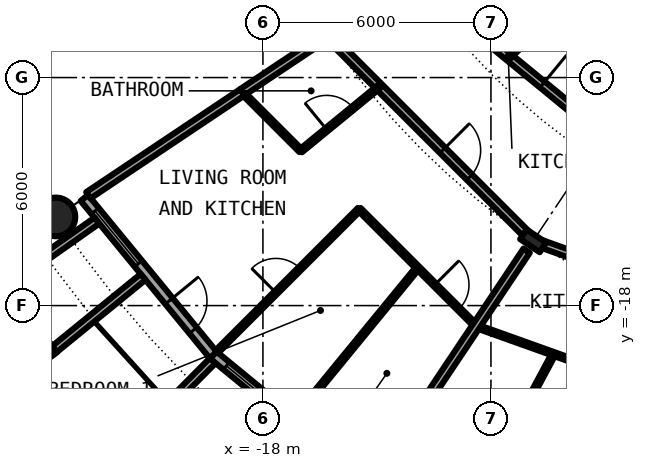
"""IFC4 building model, lengths in metres.
Left out: names, types, materials, properties, quantities, classifications, styles, units other than length and angle.
Written with IfcOpenShell. Run it as: python <this file> out.ifc"""

import sys

from ifc_helpers import new_model, si_unit, direction, frame, frame_2d, origin, origin_2d, place, context, subcontext, project, spatial, rectangle, circle, hollow_circle, i_section, extrude, element, fill, save


model = new_model("IFC4")
c1 = context("Model", 3, precision=1e-05, world=origin(), true_north=direction((0.0, 1.0)))
c2 = subcontext(c1, "Body", "Model", "MODEL_VIEW")
j1 = project(units=[si_unit("LENGTHUNIT", "METRE"), si_unit("PLANEANGLEUNIT", "RADIAN")], contexts=[c1])
p1 = place(None, origin())
s1 = spatial("IfcSite", under=j1, at=p1, CompositionType="ELEMENT")
p2 = place(p1, origin())
s2 = spatial("IfcBuilding", under=s1, at=p2, CompositionType="ELEMENT")
p3 = place(p2, frame((0.0, 0.0, 22.8)))
s3 = spatial("IfcBuildingStorey", under=s2, at=p3, CompositionType="ELEMENT", Elevation=22.8)
p4 = place(p3, frame((-23.448, -15.667, 0.0), z_axis=(0.0, 0.0, 1.0), x_axis=(1.0, 0.0, 0.0)))
e1 = element("IfcColumn", 1, at=p4, inside=s3, PredefinedType="COLUMN", context=c2, shape_type="SweptSolid", body=[
    extrude(hollow_circle(Radius=0.508, WallThickness=0.05, at=origin_2d()), origin(), (0.0, 0.0, 1.0), 3.05),
])
p5 = place(p3, frame((-10.889, -16.297, 0.0), z_axis=(0.0, 0.0, 1.0), x_axis=(-0.55557023302, -0.831469612303, 0.0)))
e2 = element("IfcColumn", 2, at=p5, inside=s3, PredefinedType="COLUMN", context=c2, shape_type="SweptSolid", body=[
    extrude(i_section(OverallWidth=0.305, OverallDepth=0.62, WebThickness=0.021, FlangeThickness=0.04, FilletRadius=0.027, at=origin_2d()), origin(), (0.0, 0.0, 1.0), 3.05),
])
p6 = place(p3, frame((-22.699, -15.167, 0.0), z_axis=(0.0, 0.0, 1.0), x_axis=(0.634382322723, -0.773019449054, 0.0)))
e3 = element("IfcWall", 3, at=p6, inside=s3, PredefinedType="SOLIDWALL", context=c2, shape_type="SweptSolid", body=[
    extrude(rectangle(XDim=5.352, YDim=0.25, at=frame_2d((2.676, 0.0))), origin(), (0.0, 0.0, 1.0), 2.7),
])
p7 = place(p6, frame((0.441, 0.0, 0.3)))
e4 = element("IfcOpeningElement", 4, at=p7, cuts=e3, PredefinedType="OPENING", context=c2, shape_type="SweptSolid", body=[
    extrude(rectangle(XDim=1.8, YDim=2.1, at=frame_2d((0.9, 1.05))), frame((0.0, 0.135, 0.0), z_axis=(0.0, -1.0, 0.0), x_axis=(1.0, 0.0, 0.0)), (0.0, 0.0, 1.0), 0.27),
])
p8 = place(p6, frame((3.51, 0.0, 0.0)))
e5 = element("IfcOpeningElement", 5, at=p8, cuts=e3, PredefinedType="OPENING", context=c2, shape_type="SweptSolid", body=[
    extrude(rectangle(XDim=1.0, YDim=2.2, at=frame_2d((0.5, 1.1))), frame((0.0, 0.135, 0.0), z_axis=(0.0, -1.0, 0.0), x_axis=(1.0, 0.0, 0.0)), (0.0, 0.0, 1.0), 0.27),
])
p9 = place(p3, frame((-24.909, -17.427, -0.03), z_axis=(0.0, 0.0, 1.0), x_axis=(0.60418752353, -0.796842165306, 0.0)))
e6 = element("IfcWall", 6, at=p9, inside=s3, PredefinedType="SOLIDWALL", context=c2, shape_type="SweptSolid", body=[
    extrude(rectangle(XDim=2.337, YDim=0.2, at=frame_2d((1.168, 0.0))), origin(), (0.0, 0.0, 1.0), 2.73),
])
p10 = place(p9, frame((0.128, 0.0, 0.33)))
e7 = element("IfcOpeningElement", 7, at=p10, cuts=e6, PredefinedType="OPENING", context=c2, shape_type="SweptSolid", body=[
    extrude(circle(Radius=1.04, at=frame_2d((1.04, 1.04))), frame((0.0, 0.11, 0.0), z_axis=(0.0, -1.0, 0.0), x_axis=(1.0, 0.0, 0.0)), (0.0, 0.0, 1.0), 0.22),
])
p11 = place(p3, frame((-22.37, -15.765, -0.03), z_axis=(0.0, 0.0, 1.0), x_axis=(-0.817256123454, -0.576274612209, 0.0)))
e8 = element("IfcWall", 8, at=p11, inside=s3, PredefinedType="SOLIDWALL", context=c2, shape_type="SweptSolid", body=[
    extrude(rectangle(XDim=2.933, YDim=0.2, at=frame_2d((1.466, 0.0))), origin(), (0.0, 0.0, 1.0), 2.73),
])
p12 = place(p3, frame((-21.155, -17.246, -0.03), z_axis=(0.0, 0.0, 1.0), x_axis=(-0.775179004516, -0.631741648902, 0.0)))
e9 = element("IfcWall", 9, at=p12, inside=s3, PredefinedType="SOLIDWALL", context=c2, shape_type="SweptSolid", body=[
    extrude(rectangle(XDim=3.006, YDim=0.2, at=frame_2d((1.503, 0.0))), origin(), (0.0, 0.0, 1.0), 2.73),
])
p13 = place(p3, frame((-19.304, -19.304, 0.0), z_axis=(0.0, 0.0, 1.0), x_axis=(0.773019449054, -0.634382322723, 0.0)))
e10 = element("IfcWall", 10, at=p13, inside=s3, PredefinedType="SOLIDWALL", context=c2, shape_type="SweptSolid", body=[
    extrude(rectangle(XDim=5.352, YDim=0.25, at=frame_2d((2.676, 0.0))), origin(), (0.0, 0.0, 1.0), 2.7),
])
p14 = place(p13, frame((0.441, 0.0, 0.3)))
e11 = element("IfcOpeningElement", 11, at=p14, cuts=e10, PredefinedType="OPENING", context=c2, shape_type="SweptSolid", body=[
    extrude(rectangle(XDim=1.8, YDim=2.1, at=frame_2d((0.9, 1.05))), frame((0.0, 0.135, 0.0), z_axis=(0.0, -1.0, 0.0), x_axis=(1.0, 0.0, 0.0)), (0.0, 0.0, 1.0), 0.27),
])
p15 = place(p13, frame((3.51, 0.0, 0.0)))
e12 = element("IfcOpeningElement", 12, at=p15, cuts=e10, PredefinedType="OPENING", context=c2, shape_type="SweptSolid", body=[
    extrude(rectangle(XDim=1.0, YDim=2.2, at=frame_2d((0.5, 1.1))), frame((0.0, 0.135, 0.0), z_axis=(0.0, -1.0, 0.0), x_axis=(1.0, 0.0, 0.0)), (0.0, 0.0, 1.0), 0.27),
])
p16 = place(p3, frame((-19.323, -19.45, -0.03), z_axis=(0.0, 0.0, 1.0), x_axis=(-0.704476739375, -0.709727076896, 0.0)))
e13 = element("IfcWall", 13, at=p16, inside=s3, PredefinedType="SOLIDWALL", context=c2, shape_type="SweptSolid", body=[
    extrude(rectangle(XDim=2.883, YDim=0.2, at=frame_2d((1.441, 0.0))), origin(), (0.0, 0.0, 1.0), 2.73),
])
p17 = place(p3, frame((-18.542, -12.389, 0.0), z_axis=(0.0, 0.0, 1.0), x_axis=(0.707106781187, -0.707106781187, 0.0)))
e14 = element("IfcWall", 14, at=p17, inside=s3, PredefinedType="PARTITIONING", context=c2, shape_type="SweptSolid", body=[
    extrude(rectangle(XDim=2.175, YDim=0.1, at=frame_2d((1.088, 0.0))), origin(), (0.0, 0.0, 1.0), 2.7),
])
p18 = place(p3, frame((-15.463, -15.468, 0.0), z_axis=(0.0, 0.0, 1.0), x_axis=(0.707106781187, -0.707106781187, 0.0)))
e15 = element("IfcWall", 15, at=p18, inside=s3, PredefinedType="PARTITIONING", context=c2, shape_type="SweptSolid", body=[
    extrude(rectangle(XDim=4.351, YDim=0.1, at=frame_2d((2.176, 0.0))), origin(), (0.0, 0.0, 1.0), 2.7),
])
p19 = place(p18, frame((2.808, 0.0, 0.0)))
e16 = element("IfcOpeningElement", 16, at=p19, cuts=e15, PredefinedType="OPENING", context=c2, shape_type="SweptSolid", body=[
    extrude(rectangle(XDim=0.9, YDim=2.3, at=frame_2d((0.45, 1.15))), frame((0.0, 0.06, 0.0), z_axis=(0.0, -1.0, 0.0), x_axis=(1.0, 0.0, 0.0)), (0.0, 0.0, 1.0), 0.12),
])
p20 = place(p3, frame((-12.389, -18.542, 0.0), z_axis=(0.0, 0.0, 1.0), x_axis=(0.941556976264, -0.336853767159, 0.0)))
e17 = element("IfcWall", 17, at=p20, inside=s3, PredefinedType="PARTITIONING", context=c2, shape_type="SweptSolid", body=[
    extrude(rectangle(XDim=4.334, YDim=0.1, at=frame_2d((2.167, 0.0))), origin(), (0.0, 0.0, 1.0), 2.7),
])
p21 = place(p3, frame((-16.187, -10.999, 0.0), z_axis=(0.0, 0.0, 1.0), x_axis=(0.707106781187, -0.707106781187, 0.0)))
e18 = element("IfcWall", 18, at=p21, inside=s3, PredefinedType="PARTITIONING", context=c2, shape_type="SweptSolid", body=[
    extrude(rectangle(XDim=7.337, YDim=0.2, at=frame_2d((3.668, 0.0))), origin(), (0.0, 0.0, 1.0), 2.38),
])
p22 = place(p21, frame((4.124, 0.0, 0.0)))
e19 = element("IfcOpeningElement", 19, at=p22, cuts=e18, PredefinedType="OPENING", context=c2, shape_type="SweptSolid", body=[
    extrude(rectangle(XDim=1.0, YDim=2.3, at=frame_2d((0.5, 1.15))), frame((0.0, 0.11, 0.0), z_axis=(0.0, -1.0, 0.0), x_axis=(1.0, 0.0, 0.0)), (0.0, 0.0, 1.0), 0.22),
])
p23 = place(p3, frame((-10.741, -16.35, 0.0), z_axis=(0.0, 0.0, 1.0), x_axis=(0.941539496009, -0.336902623105, 0.0)))
e20 = element("IfcWall", 20, at=p23, inside=s3, PredefinedType="PARTITIONING", context=c2, shape_type="SweptSolid", body=[
    extrude(rectangle(XDim=9.368, YDim=0.2, at=frame_2d((4.684, 0.0))), origin(), (0.0, 0.0, 1.0), 2.38),
])
p24 = place(p23, frame((5.057, 0.0, 0.0)))
e21 = element("IfcOpeningElement", 21, at=p24, cuts=e20, PredefinedType="OPENING", context=c2, shape_type="SweptSolid", body=[
    extrude(rectangle(XDim=1.0, YDim=2.3, at=frame_2d((0.5, 1.15))), frame((0.0, 0.11, 0.0), z_axis=(0.0, -1.0, 0.0), x_axis=(1.0, 0.0, 0.0)), (0.0, 0.0, 1.0), 0.22),
])
p25 = place(p3, frame((-14.038, -9.402, 0.0), z_axis=(0.0, 0.0, 1.0), x_axis=(0.773084654695, -0.634302858794, 0.0)))
e22 = element("IfcWall", 22, at=p25, inside=s3, PredefinedType="PARTITIONING", context=c2, shape_type="SweptSolid", body=[
    extrude(rectangle(XDim=9.793, YDim=0.2, at=frame_2d((4.896, 0.0))), origin(), (0.0, 0.0, 1.0), 2.7),
])
p26 = place(p25, frame((4.387, 0.0, 0.0)))
e23 = element("IfcOpeningElement", 23, at=p26, cuts=e22, PredefinedType="OPENING", context=c2, shape_type="SweptSolid", body=[
    extrude(rectangle(XDim=1.0, YDim=2.3, at=frame_2d((0.5, 1.15))), frame((0.0, 0.11, 0.0), z_axis=(0.0, -1.0, 0.0), x_axis=(1.0, 0.0, 0.0)), (0.0, 0.0, 1.0), 0.22),
])
p27 = place(p3, frame((-18.544, -12.387, 0.0), z_axis=(0.0, 0.0, 1.0), x_axis=(0.832066006555, 0.554676627176, 0.0)))
e24 = element("IfcWall", 24, at=p27, inside=s3, PredefinedType="PARTITIONING", context=c2, shape_type="SweptSolid", body=[
    extrude(rectangle(XDim=2.39, YDim=0.2, at=frame_2d((1.195, 0.0))), origin(), (0.0, 0.0, 1.0), 2.7),
])
p28 = place(p3, frame((-22.595, -15.098, 0.0), z_axis=(0.0, 0.0, 1.0), x_axis=(0.831387096605, 0.55569370664, 0.0)))
e25 = element("IfcWall", 25, at=p28, inside=s3, PredefinedType="PARTITIONING", context=c2, shape_type="SweptSolid", body=[
    extrude(rectangle(XDim=4.875, YDim=0.2, at=frame_2d((2.438, 0.0))), origin(), (0.0, 0.0, 1.0), 2.7),
])
p29 = place(p3, frame((-19.216, -19.216, 0.0), z_axis=(0.0, 0.0, 1.0), x_axis=(0.707106781187, 0.707106781187, 0.0)))
e26 = element("IfcWall", 26, at=p29, inside=s3, PredefinedType="PARTITIONING", context=c2, shape_type="SweptSolid", body=[
    extrude(rectangle(XDim=5.305, YDim=0.1, at=frame_2d((2.652, 0.0))), origin(), (0.0, 0.0, 1.0), 2.7),
])
p30 = place(p29, frame((2.202, 0.0, 0.0)))
e27 = element("IfcOpeningElement", 27, at=p30, cuts=e26, PredefinedType="OPENING", context=c2, shape_type="SweptSolid", body=[
    extrude(rectangle(XDim=0.9, YDim=2.3, at=frame_2d((0.45, 1.15))), frame((0.0, 0.06, 0.0), z_axis=(0.0, -1.0, 0.0), x_axis=(1.0, 0.0, 0.0)), (0.0, 0.0, 1.0), 0.12),
])
p31 = place(p3, frame((-17.22, -21.023, 0.0), z_axis=(0.0, 0.0, 1.0), x_axis=(0.633774976367, 0.773517471898, 0.0)))
e28 = element("IfcWall", 28, at=p31, inside=s3, PredefinedType="PARTITIONING", context=c2, shape_type="SweptSolid", body=[
    extrude(rectangle(XDim=5.196, YDim=0.1, at=frame_2d((2.598, 0.0))), origin(), (0.0, 0.0, 1.0), 2.7),
])
p32 = place(p3, frame((-17.004, -13.927, 0.0), z_axis=(0.0, 0.0, 1.0), x_axis=(0.77367517848, 0.633582447834, 0.0)))
e29 = element("IfcWall", 29, at=p32, inside=s3, PredefinedType="PARTITIONING", context=c2, shape_type="SweptSolid", body=[
    extrude(rectangle(XDim=2.661, YDim=0.1, at=frame_2d((1.331, 0.0))), origin(), (0.0, 0.0, 1.0), 2.7),
])
p33 = place(p32, frame((0.881, 0.0, 0.0)))
e30 = element("IfcOpeningElement", 30, at=p33, cuts=e29, PredefinedType="OPENING", context=c2, shape_type="SweptSolid", body=[
    extrude(rectangle(XDim=0.9, YDim=2.3, at=frame_2d((0.45, 1.15))), frame((0.0, 0.06, 0.0), z_axis=(0.0, -1.0, 0.0), x_axis=(1.0, 0.0, 0.0)), (0.0, 0.0, 1.0), 0.12),
])
p34 = place(p3, frame((-15.098, -22.595, 0.0), z_axis=(0.0, 0.0, 1.0), x_axis=(0.55566921314, 0.831403467378, 0.0)))
e31 = element("IfcWall", 31, at=p34, inside=s3, PredefinedType="PARTITIONING", context=c2, shape_type="SweptSolid", body=[
    extrude(rectangle(XDim=7.265, YDim=0.2, at=frame_2d((3.632, 0.0))), origin(), (0.0, 0.0, 1.0), 2.7),
])
p35 = place(p3, frame((-12.856, -23.942, 0.0), z_axis=(0.0, 0.0, 1.0), x_axis=(0.472967735543, 0.881079747319, 0.0)))
e32 = element("IfcWall", 32, at=p35, inside=s3, PredefinedType="PARTITIONING", context=c2, shape_type="SweptSolid", body=[
    extrude(rectangle(XDim=5.3, YDim=0.1, at=frame_2d((2.65, 0.0))), origin(), (0.0, 0.0, 1.0), 2.7),
])
p36 = place(p35, frame((2.2, 0.0, 0.0)))
e33 = element("IfcOpeningElement", 33, at=p36, cuts=e32, PredefinedType="OPENING", context=c2, shape_type="SweptSolid", body=[
    extrude(rectangle(XDim=0.9, YDim=2.3, at=frame_2d((0.45, 1.15))), frame((0.0, 0.06, 0.0), z_axis=(0.0, -1.0, 0.0), x_axis=(1.0, 0.0, 0.0)), (0.0, 0.0, 1.0), 0.12),
])
p37 = place(p3, frame((-11.524, -11.464, 0.0), z_axis=(0.0, 0.0, 1.0), x_axis=(0.708796844581, 0.705412668665, 0.0)))
e34 = element("IfcWall", 34, at=p37, inside=s3, PredefinedType="PARTITIONING", context=c2, shape_type="SweptSolid", body=[
    extrude(rectangle(XDim=2.597, YDim=0.1, at=frame_2d((1.299, 0.0))), origin(), (0.0, 0.0, 1.0), 2.7),
])
p38 = place(p37, frame((0.849, 0.0, 0.0)))
e35 = element("IfcOpeningElement", 35, at=p38, cuts=e34, PredefinedType="OPENING", context=c2, shape_type="SweptSolid", body=[
    extrude(rectangle(XDim=0.9, YDim=2.3, at=frame_2d((0.45, 1.15))), frame((0.0, 0.06, 0.0), z_axis=(0.0, -1.0, 0.0), x_axis=(1.0, 0.0, 0.0)), (0.0, 0.0, 1.0), 0.12),
])
p39 = place(p3, frame((-10.424, -25.096, 0.0), z_axis=(0.0, 0.0, 1.0), x_axis=(0.383616168183, 0.923492628833, 0.0)))
e36 = element("IfcWall", 36, at=p39, inside=s3, PredefinedType="PARTITIONING", context=c2, shape_type="SweptSolid", body=[
    extrude(rectangle(XDim=8.138, YDim=0.1, at=frame_2d((4.069, 0.0))), origin(), (0.0, 0.0, 1.0), 2.7),
])
p40 = place(p39, frame((6.377, 0.0, 0.0)))
e37 = element("IfcOpeningElement", 37, at=p40, cuts=e36, PredefinedType="OPENING", context=c2, shape_type="SweptSolid", body=[
    extrude(rectangle(XDim=0.9, YDim=2.3, at=frame_2d((0.45, 1.15))), frame((0.0, 0.06, 0.0), z_axis=(0.0, -1.0, 0.0), x_axis=(1.0, 0.0, 0.0)), (0.0, 0.0, 1.0), 0.12),
])
p41 = place(p39, frame((2.308, 0.0, 0.0)))
e38 = element("IfcOpeningElement", 38, at=p41, cuts=e36, PredefinedType="OPENING", context=c2, shape_type="SweptSolid", body=[
    extrude(rectangle(XDim=0.9, YDim=2.3, at=frame_2d((0.45, 1.15))), frame((0.0, 0.06, 0.0), z_axis=(0.0, -1.0, 0.0), x_axis=(1.0, 0.0, 0.0)), (0.0, 0.0, 1.0), 0.12),
])
p42 = place(p7, origin())
e39 = element("IfcWindow", 39, at=p42, inside=s3, PartitioningType="SINGLE_PANEL", PredefinedType="WINDOW", context=c2, shape_type="SweptSolid", body=[
    extrude(rectangle(XDim=1.8, YDim=2.1, at=frame_2d((0.9, 1.05))), frame((0.0, 0.03, 0.0), z_axis=(0.0, -1.0, 0.0), x_axis=(1.0, 0.0, 0.0)), (0.0, 0.0, 1.0), 0.06),
])
fill(e4, e39)
p43 = place(p8, origin())
e40 = element("IfcDoor", 40, at=p43, inside=s3, OperationType="SINGLE_SWING_LEFT", PredefinedType="DOOR", context=c2, shape_type="SweptSolid", body=[
    extrude(rectangle(XDim=1.0, YDim=2.2, at=frame_2d((0.5, 1.1))), frame((0.0, 0.025, 0.0), z_axis=(0.0, -1.0, 0.0), x_axis=(1.0, 0.0, 0.0)), (0.0, 0.0, 1.0), 0.05),
])
fill(e5, e40)
p44 = place(p14, origin())
e41 = element("IfcWindow", 41, at=p44, inside=s3, PartitioningType="SINGLE_PANEL", PredefinedType="WINDOW", context=c2, shape_type="SweptSolid", body=[
    extrude(rectangle(XDim=1.8, YDim=2.1, at=frame_2d((0.9, 1.05))), frame((0.0, 0.03, 0.0), z_axis=(0.0, -1.0, 0.0), x_axis=(1.0, 0.0, 0.0)), (0.0, 0.0, 1.0), 0.06),
])
fill(e11, e41)
p45 = place(p22, origin())
e42 = element("IfcDoor", 42, at=p45, inside=s3, OperationType="SINGLE_SWING_RIGHT", PredefinedType="DOOR", context=c2, shape_type="SweptSolid", body=[
    extrude(rectangle(XDim=1.0, YDim=2.3, at=frame_2d((0.5, 1.15))), frame((0.0, 0.025, 0.0), z_axis=(0.0, -1.0, 0.0), x_axis=(1.0, 0.0, 0.0)), (0.0, 0.0, 1.0), 0.05),
])
fill(e19, e42)
p46 = place(p33, origin())
e43 = element("IfcDoor", 43, at=p46, inside=s3, OperationType="SINGLE_SWING_RIGHT", PredefinedType="DOOR", context=c2, shape_type="SweptSolid", body=[
    extrude(rectangle(XDim=0.9, YDim=2.3, at=frame_2d((0.45, 1.15))), frame((0.0, 0.025, 0.0), z_axis=(0.0, -1.0, 0.0), x_axis=(1.0, 0.0, 0.0)), (0.0, 0.0, 1.0), 0.05),
])
fill(e30, e43)
p47 = place(p30, origin())
e44 = element("IfcDoor", 44, at=p47, inside=s3, OperationType="SINGLE_SWING_LEFT", PredefinedType="DOOR", context=c2, shape_type="SweptSolid", body=[
    extrude(rectangle(XDim=0.9, YDim=2.3, at=frame_2d((0.45, 1.15))), frame((0.0, 0.025, 0.0), z_axis=(0.0, -1.0, 0.0), x_axis=(1.0, 0.0, 0.0)), (0.0, 0.0, 1.0), 0.05),
])
fill(e27, e44)
p48 = place(p19, origin())
e45 = element("IfcDoor", 45, at=p48, inside=s3, OperationType="SINGLE_SWING_RIGHT", PredefinedType="DOOR", context=c2, shape_type="SweptSolid", body=[
    extrude(rectangle(XDim=0.9, YDim=2.3, at=frame_2d((0.45, 1.15))), frame((0.0, 0.025, 0.0), z_axis=(0.0, -1.0, 0.0), x_axis=(1.0, 0.0, 0.0)), (0.0, 0.0, 1.0), 0.05),
])
fill(e16, e45)
p49 = place(p26, origin())
e46 = element("IfcDoor", 46, at=p49, inside=s3, OperationType="SINGLE_SWING_LEFT", PredefinedType="DOOR", context=c2, shape_type="SweptSolid", body=[
    extrude(rectangle(XDim=1.0, YDim=2.3, at=frame_2d((0.5, 1.15))), frame((0.0, 0.025, 0.0), z_axis=(0.0, -1.0, 0.0), x_axis=(1.0, 0.0, 0.0)), (0.0, 0.0, 1.0), 0.05),
])
fill(e23, e46)
save(model, sys.argv[1])
